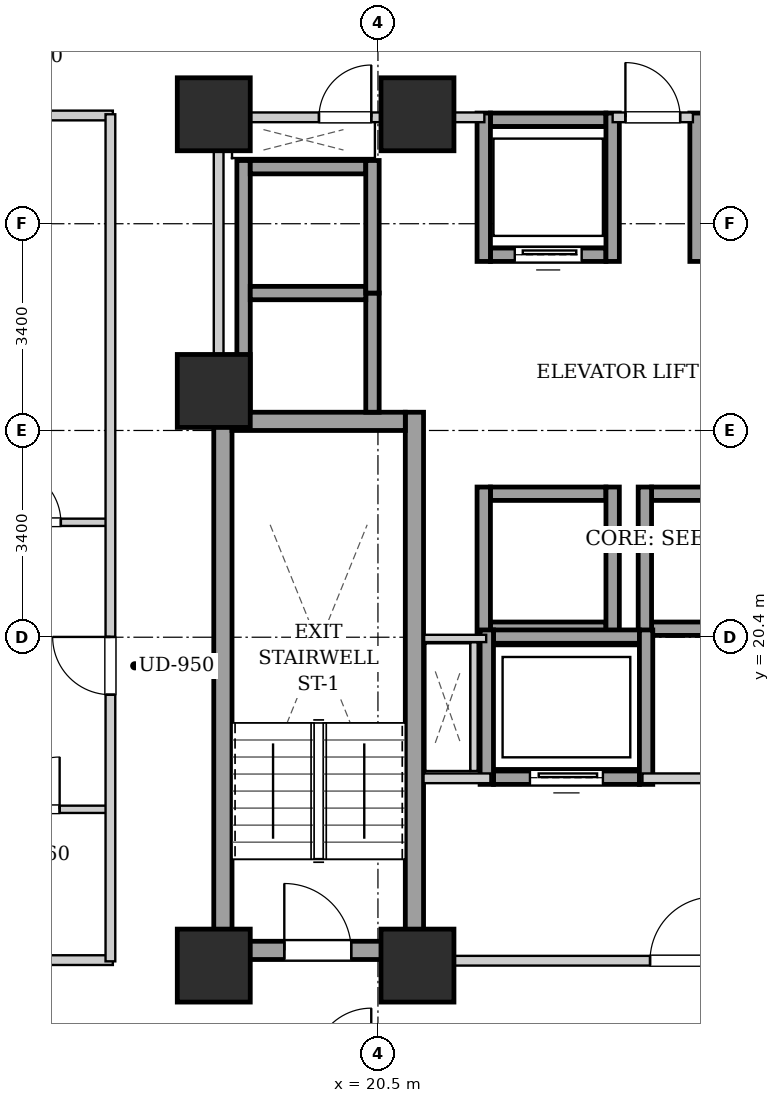
"""IFC4 building model, lengths in metres.
Left out: names, types, materials, properties, quantities, classifications, styles, units other than length and angle.
Written with IfcOpenShell. Run it as: python <this file> out.ifc"""

import sys

from ifc_helpers import new_model, si_unit, direction, frame, frame_2d, origin, origin_2d, place, context, subcontext, project, spatial, rectangle, extrude, element, fill, save


model = new_model("IFC4")
c1 = context("Model", 3, precision=1e-05, world=origin(), true_north=direction((0.0, 1.0)))
c2 = subcontext(c1, "Body", "Model", "MODEL_VIEW")
j1 = project(units=[si_unit("LENGTHUNIT", "METRE"), si_unit("PLANEANGLEUNIT", "RADIAN")], contexts=[c1])
p1 = place(None, origin())
s1 = spatial("IfcSite", under=j1, at=p1, CompositionType="ELEMENT")
p2 = place(p1, origin())
s2 = spatial("IfcBuilding", under=s1, at=p2, CompositionType="ELEMENT")
p3 = place(p2, frame((0.0, 0.0, 51.4)))
s3 = spatial("IfcBuildingStorey", under=s2, at=p3, CompositionType="ELEMENT", Elevation=51.4)
for number, where, z_axis, x_axis in (
    (1, (17.8, 15.0, 0.0), (0.0, 0.0, 1.0), (1.0, 0.0, 0.0)),
    (2, (21.15, 15.0, 0.0), (0.0, 0.0, 1.0), (1.0, 0.0, 0.0)),
    (3, (17.8, 29.0, 0.0), (0.0, 0.0, 1.0), (1.0, 0.0, 0.0)),
    (4, (21.15, 29.0, 0.0), (0.0, 0.0, 1.0), (1.0, 0.0, 0.0)),
    (5, (17.8, 24.45, 0.0), (0.0, 0.0, 1.0), (1.0, 0.0, 0.0)),
):
    element("IfcColumn", number, at=place(p3, frame(where, z_axis=z_axis, x_axis=x_axis)), inside=s3, PredefinedType="COLUMN", context=c2, shape_type="SweptSolid", body=[
        extrude(rectangle(XDim=1.2, YDim=1.2, at=origin_2d()), origin(), (0.0, 0.0, 1.0), 3.2),
    ])
for number, where, z_axis, x_axis in (
    (6, (17.95, 15.1, 0.0), (0.0, 0.0, 1.0), (0.0, 1.0, 0.0)),
    (7, (21.1, 15.1, 0.0), (0.0, 0.0, 1.0), (0.0, 1.0, 0.0)),
):
    element("IfcWall", number, at=place(p3, frame(where, z_axis=z_axis, x_axis=x_axis)), inside=s3, PredefinedType="SHEAR", context=c2, shape_type="SweptSolid", body=[
        extrude(rectangle(XDim=9.0, YDim=0.3, at=frame_2d((4.5, 0.0))), origin(), (0.0, 0.0, 1.0), 2.94),
    ])
p4 = place(p3, frame((18.1, 23.95, 0.0), z_axis=(0.0, 0.0, 1.0), x_axis=(1.0, 0.0, 0.0)))
e8 = element("IfcWall", 8, at=p4, inside=s3, PredefinedType="SHEAR", context=c2, shape_type="SweptSolid", body=[
    extrude(rectangle(XDim=2.85, YDim=0.3, at=frame_2d((1.425, 0.0))), origin(), (0.0, 0.0, 1.0), 2.94),
])
p5 = place(p3, frame((18.1, 15.25, 0.0), z_axis=(0.0, 0.0, 1.0), x_axis=(1.0, 0.0, 0.0)))
e9 = element("IfcWall", 9, at=p5, inside=s3, PredefinedType="SHEAR", context=c2, shape_type="SweptSolid", body=[
    extrude(rectangle(XDim=2.85, YDim=0.3, at=frame_2d((1.425, 0.0))), origin(), (0.0, 0.0, 1.0), 2.94),
])
p6 = place(p5, frame((0.86, 0.0, 0.0)))
e10 = element("IfcOpeningElement", 10, at=p6, cuts=e9, PredefinedType="OPENING", context=c2, shape_type="SweptSolid", body=[
    extrude(rectangle(XDim=1.1, YDim=2.05, at=frame_2d((0.55, 1.025))), frame((0.0, 0.16, 0.0), z_axis=(0.0, -1.0, 0.0), x_axis=(1.0, 0.0, 0.0)), (0.0, 0.0, 1.0), 0.32),
])
p7 = place(p3, frame((22.35, 26.69, 0.0), z_axis=(0.0, 0.0, 1.0), x_axis=(1.0, 0.0, 0.0)))
e11 = element("IfcWall", 11, at=p7, inside=s3, PredefinedType="SHEAR", context=c2, shape_type="SweptSolid", body=[
    extrude(rectangle(XDim=1.9, YDim=0.22, at=frame_2d((0.95, 0.0))), origin(), (0.0, 0.0, 1.0), 2.94),
])
p8 = place(p7, frame((0.4, 0.0, 0.0)))
e12 = element("IfcOpeningElement", 12, at=p8, cuts=e11, PredefinedType="OPENING", context=c2, shape_type="SweptSolid", body=[
    extrude(rectangle(XDim=1.1, YDim=2.15, at=frame_2d((0.55, 1.075))), frame((0.0, 0.12, 0.0), z_axis=(0.0, -1.0, 0.0), x_axis=(1.0, 0.0, 0.0)), (0.0, 0.0, 1.0), 0.24),
])
p9 = place(p3, frame((22.35, 28.91, 0.0), z_axis=(0.0, 0.0, 1.0), x_axis=(1.0, 0.0, 0.0)))
e13 = element("IfcWall", 13, at=p9, inside=s3, PredefinedType="SHEAR", context=c2, shape_type="SweptSolid", body=[
    extrude(rectangle(XDim=1.9, YDim=0.22, at=frame_2d((0.95, 0.0))), origin(), (0.0, 0.0, 1.0), 2.94),
])
for number, where, z_axis, x_axis in (
    (14, (22.24, 26.58, 0.0), (0.0, 0.0, 1.0), (0.0, 1.0, 0.0)),
    (15, (24.36, 26.58, 0.0), (0.0, 0.0, 1.0), (0.0, 1.0, 0.0)),
    (16, (25.74, 26.58, 0.0), (0.0, 0.0, 1.0), (0.0, 1.0, 0.0)),
):
    element("IfcWall", number, at=place(p3, frame(where, z_axis=z_axis, x_axis=x_axis)), inside=s3, PredefinedType="SHEAR", context=c2, shape_type="SweptSolid", body=[
        extrude(rectangle(XDim=2.44, YDim=0.22, at=frame_2d((1.22, 0.0))), origin(), (0.0, 0.0, 1.0), 2.94),
    ])
for number, where, z_axis, x_axis in (
    (17, (22.35, 20.54, 0.0), (0.0, 0.0, 1.0), (1.0, 0.0, 0.0)),
    (18, (22.35, 22.76, 0.0), (0.0, 0.0, 1.0), (1.0, 0.0, 0.0)),
):
    element("IfcWall", number, at=place(p3, frame(where, z_axis=z_axis, x_axis=x_axis)), inside=s3, PredefinedType="SHEAR", context=c2, shape_type="SweptSolid", body=[
        extrude(rectangle(XDim=1.9, YDim=0.22, at=frame_2d((0.95, 0.0))), origin(), (0.0, 0.0, 1.0), 2.94),
    ])
for number, where, z_axis, x_axis in (
    (19, (22.24, 20.43, 0.0), (0.0, 0.0, 1.0), (0.0, 1.0, 0.0)),
    (20, (24.36, 20.43, 0.0), (0.0, 0.0, 1.0), (0.0, 1.0, 0.0)),
):
    element("IfcWall", number, at=place(p3, frame(where, z_axis=z_axis, x_axis=x_axis)), inside=s3, PredefinedType="SHEAR", context=c2, shape_type="SweptSolid", body=[
        extrude(rectangle(XDim=2.44, YDim=0.22, at=frame_2d((1.22, 0.0))), origin(), (0.0, 0.0, 1.0), 2.94),
    ])
for number, where, z_axis, x_axis in (
    (21, (25.0, 20.54, 0.0), (0.0, 0.0, 1.0), (1.0, 0.0, 0.0)),
    (22, (25.0, 22.76, 0.0), (0.0, 0.0, 1.0), (1.0, 0.0, 0.0)),
):
    element("IfcWall", number, at=place(p3, frame(where, z_axis=z_axis, x_axis=x_axis)), inside=s3, PredefinedType="SHEAR", context=c2, shape_type="SweptSolid", body=[
        extrude(rectangle(XDim=1.9, YDim=0.22, at=frame_2d((0.95, 0.0))), origin(), (0.0, 0.0, 1.0), 2.94),
    ])
p10 = place(p3, frame((24.89, 20.43, 0.0), z_axis=(0.0, 0.0, 1.0), x_axis=(0.0, 1.0, 0.0)))
e23 = element("IfcWall", 23, at=p10, inside=s3, PredefinedType="SHEAR", context=c2, shape_type="SweptSolid", body=[
    extrude(rectangle(XDim=2.44, YDim=0.22, at=frame_2d((1.22, 0.0))), origin(), (0.0, 0.0, 1.0), 2.94),
])
p11 = place(p3, frame((18.29, 24.1, 0.0), z_axis=(0.0, 0.0, 1.0), x_axis=(0.0, 1.0, 0.0)))
e24 = element("IfcWall", 24, at=p11, inside=s3, PredefinedType="SHEAR", context=c2, shape_type="SweptSolid", body=[
    extrude(rectangle(XDim=4.14, YDim=0.22, at=frame_2d((2.07, 0.0))), origin(), (0.0, 0.0, 1.0), 2.94),
])
p12 = place(p3, frame((20.41, 24.1, 0.0), z_axis=(0.0, 0.0, 1.0), x_axis=(0.0, 1.0, 0.0)))
e25 = element("IfcWall", 25, at=p12, inside=s3, PredefinedType="SHEAR", context=c2, shape_type="SweptSolid", body=[
    extrude(rectangle(XDim=1.96, YDim=0.22, at=frame_2d((0.98, 0.0))), origin(), (0.0, 0.0, 1.0), 2.94),
])
for number, where, z_axis, x_axis in (
    (26, (18.4, 26.06, 0.0), (0.0, 0.0, 1.0), (1.0, 0.0, 0.0)),
    (27, (18.4, 28.13, 0.0), (0.0, 0.0, 1.0), (1.0, 0.0, 0.0)),
):
    element("IfcWall", number, at=place(p3, frame(where, z_axis=z_axis, x_axis=x_axis)), inside=s3, PredefinedType="SHEAR", context=c2, shape_type="SweptSolid", body=[
        extrude(rectangle(XDim=1.9, YDim=0.22, at=frame_2d((0.95, 0.0))), origin(), (0.0, 0.0, 1.0), 2.94),
    ])
p13 = place(p3, frame((20.41, 26.06, 0.0), z_axis=(0.0, 0.0, 1.0), x_axis=(0.0, 1.0, 0.0)))
e28 = element("IfcWall", 28, at=p13, inside=s3, PredefinedType="SHEAR", context=c2, shape_type="SweptSolid", body=[
    extrude(rectangle(XDim=2.18, YDim=0.22, at=frame_2d((1.09, 0.0))), origin(), (0.0, 0.0, 1.0), 2.94),
])
p14 = place(p3, frame((22.4, 18.09, 0.0), z_axis=(0.0, 0.0, 1.0), x_axis=(1.0, 0.0, 0.0)))
e29 = element("IfcWall", 29, at=p14, inside=s3, PredefinedType="SHEAR", context=c2, shape_type="SweptSolid", body=[
    extrude(rectangle(XDim=2.4, YDim=0.22, at=frame_2d((1.2, 0.0))), origin(), (0.0, 0.0, 1.0), 2.94),
])
p15 = place(p14, frame((0.6, 0.0, 0.0)))
e30 = element("IfcOpeningElement", 30, at=p15, cuts=e29, PredefinedType="OPENING", context=c2, shape_type="SweptSolid", body=[
    extrude(rectangle(XDim=1.2, YDim=2.15, at=frame_2d((0.6, 1.075))), frame((0.0, 0.12, 0.0), z_axis=(0.0, -1.0, 0.0), x_axis=(1.0, 0.0, 0.0)), (0.0, 0.0, 1.0), 0.24),
])
p16 = place(p3, frame((22.4, 20.41, 0.0), z_axis=(0.0, 0.0, 1.0), x_axis=(1.0, 0.0, 0.0)))
e31 = element("IfcWall", 31, at=p16, inside=s3, PredefinedType="SHEAR", context=c2, shape_type="SweptSolid", body=[
    extrude(rectangle(XDim=2.4, YDim=0.22, at=frame_2d((1.2, 0.0))), origin(), (0.0, 0.0, 1.0), 2.94),
])
for number, where, z_axis, x_axis in (
    (32, (22.29, 17.98, 0.0), (0.0, 0.0, 1.0), (0.0, 1.0, 0.0)),
    (33, (24.91, 17.98, 0.0), (0.0, 0.0, 1.0), (0.0, 1.0, 0.0)),
):
    element("IfcWall", number, at=place(p3, frame(where, z_axis=z_axis, x_axis=x_axis)), inside=s3, PredefinedType="SHEAR", context=c2, shape_type="SweptSolid", body=[
        extrude(rectangle(XDim=2.54, YDim=0.22, at=frame_2d((1.27, 0.0))), origin(), (0.0, 0.0, 1.0), 2.94),
    ])
p17 = place(p3, frame((21.25, 15.08, 0.0), z_axis=(0.0, 0.0, 1.0), x_axis=(1.0, 0.0, 0.0)))
e34 = element("IfcWall", 34, at=p17, inside=s3, PredefinedType="PARTITIONING", context=c2, shape_type="SweptSolid", body=[
    extrude(rectangle(XDim=8.5, YDim=0.16, at=frame_2d((4.25, 0.0))), origin(), (0.0, 0.0, 1.0), 2.232),
])
p18 = place(p17, frame((3.725, 0.0, 0.0)))
e35 = element("IfcOpeningElement", 35, at=p18, cuts=e34, PredefinedType="OPENING", context=c2, shape_type="SweptSolid", body=[
    extrude(rectangle(XDim=1.05, YDim=2.05, at=frame_2d((0.525, 1.025))), frame((0.0, 0.09, 0.0), z_axis=(0.0, -1.0, 0.0), x_axis=(1.0, 0.0, 0.0)), (0.0, 0.0, 1.0), 0.18),
])
p19 = place(p3, frame((21.25, 18.08, 0.0), z_axis=(0.0, 0.0, 1.0), x_axis=(1.0, 0.0, 0.0)))
e36 = element("IfcWall", 36, at=p19, inside=s3, PredefinedType="PARTITIONING", context=c2, shape_type="SweptSolid", body=[
    extrude(rectangle(XDim=1.1, YDim=0.16, at=frame_2d((0.55, 0.0))), origin(), (0.0, 0.0, 1.0), 2.94),
])
p20 = place(p3, frame((24.85, 18.08, 0.0), z_axis=(0.0, 0.0, 1.0), x_axis=(1.0, 0.0, 0.0)))
e37 = element("IfcWall", 37, at=p20, inside=s3, PredefinedType="PARTITIONING", context=c2, shape_type="SweptSolid", body=[
    extrude(rectangle(XDim=1.3, YDim=0.16, at=frame_2d((0.65, 0.0))), origin(), (0.0, 0.0, 1.0), 2.94),
])
p21 = place(p3, frame((17.88, 24.12, 0.0), z_axis=(0.0, 0.0, 1.0), x_axis=(0.0, 1.0, 0.0)))
e38 = element("IfcWall", 38, at=p21, inside=s3, PredefinedType="PARTITIONING", context=c2, shape_type="SweptSolid", body=[
    extrude(rectangle(XDim=4.76, YDim=0.16, at=frame_2d((2.38, 0.0))), origin(), (0.0, 0.0, 1.0), 2.94),
])
p22 = place(p3, frame((24.36, 28.95, 0.0), z_axis=(0.0, 0.0, 1.0), x_axis=(1.0, 0.0, 0.0)))
e39 = element("IfcWall", 39, at=p22, inside=s3, PredefinedType="PARTITIONING", context=c2, shape_type="SweptSolid", body=[
    extrude(rectangle(XDim=1.32, YDim=0.16, at=frame_2d((0.66, 0.0))), origin(), (0.0, 0.0, 1.0), 2.232),
])
p23 = place(p22, frame((0.21, 0.0, 0.0)))
e40 = element("IfcOpeningElement", 40, at=p23, cuts=e39, PredefinedType="OPENING", context=c2, shape_type="SweptSolid", body=[
    extrude(rectangle(XDim=0.9, YDim=2.05, at=frame_2d((0.45, 1.025))), frame((0.0, 0.09, 0.0), z_axis=(0.0, -1.0, 0.0), x_axis=(1.0, 0.0, 0.0)), (0.0, 0.0, 1.0), 0.18),
])
p24 = place(p3, frame((17.96, 28.95, 0.0), z_axis=(0.0, 0.0, 1.0), x_axis=(1.0, 0.0, 0.0)))
e41 = element("IfcWall", 41, at=p24, inside=s3, PredefinedType="PARTITIONING", context=c2, shape_type="SweptSolid", body=[
    extrude(rectangle(XDim=4.29, YDim=0.16, at=frame_2d((2.145, 0.0))), origin(), (0.0, 0.0, 1.0), 2.232),
])
p25 = place(p24, frame((1.57, 0.0, 0.0)))
e42 = element("IfcOpeningElement", 42, at=p25, cuts=e41, PredefinedType="OPENING", context=c2, shape_type="SweptSolid", body=[
    extrude(rectangle(XDim=0.86, YDim=2.05, at=frame_2d((0.43, 1.025))), frame((0.0, 0.09, 0.0), z_axis=(0.0, -1.0, 0.0), x_axis=(1.0, 0.0, 0.0)), (0.0, 0.0, 1.0), 0.18),
])
p26 = place(p3, frame((22.08, 18.2, 0.0), z_axis=(0.0, 0.0, 1.0), x_axis=(0.0, 1.0, 0.0)))
e43 = element("IfcWall", 43, at=p26, inside=s3, PredefinedType="PARTITIONING", context=c2, shape_type="SweptSolid", body=[
    extrude(rectangle(XDim=2.12, YDim=0.12, at=frame_2d((1.06, 0.0))), origin(), (0.0, 0.0, 1.0), 2.94),
])
p27 = place(p3, frame((22.28, 20.38, 0.0), z_axis=(0.0, 0.0, 1.0), x_axis=(-1.0, 0.0, 0.0)))
e44 = element("IfcWall", 44, at=p27, inside=s3, PredefinedType="PARTITIONING", context=c2, shape_type="SweptSolid", body=[
    extrude(rectangle(XDim=1.02, YDim=0.12, at=frame_2d((0.51, 0.0))), origin(), (0.0, 0.0, 1.0), 2.94),
])
for number, where, z_axis, x_axis in (
    (45, (7.78, 15.09, 0.0), (0.0, 0.0, 1.0), (1.0, 0.0, 0.0)),
    (46, (7.78, 28.98, 0.0), (0.0, 0.0, 1.0), (1.0, 0.0, 0.0)),
):
    element("IfcWall", number, at=place(p3, frame(where, z_axis=z_axis, x_axis=x_axis)), inside=s3, PredefinedType="PARTITIONING", context=c2, shape_type="SweptSolid", body=[
        extrude(rectangle(XDim=8.36, YDim=0.16, at=frame_2d((4.18, 0.0))), origin(), (0.0, 0.0, 1.0), 2.232),
    ])
p28 = place(p3, frame((13.61, 22.29, 0.0), z_axis=(0.0, 0.0, 1.0), x_axis=(1.0, 0.0, 0.0)))
e47 = element("IfcWall", 47, at=p28, inside=s3, PredefinedType="PARTITIONING", context=c2, shape_type="SweptSolid", body=[
    extrude(rectangle(XDim=2.45, YDim=0.12, at=frame_2d((1.225, 0.0))), origin(), (0.0, 0.0, 1.0), 2.94),
])
p29 = place(p28, frame((0.775, 0.0, 0.0)))
e48 = element("IfcOpeningElement", 48, at=p29, cuts=e47, PredefinedType="OPENING", context=c2, shape_type="SweptSolid", body=[
    extrude(rectangle(XDim=0.9, YDim=2.05, at=frame_2d((0.45, 1.025))), frame((0.0, 0.07, 0.0), z_axis=(0.0, -1.0, 0.0), x_axis=(1.0, 0.0, 0.0)), (0.0, 0.0, 1.0), 0.14),
])
p30 = place(p3, frame((13.61, 17.57, 0.0), z_axis=(0.0, 0.0, 1.0), x_axis=(1.0, 0.0, 0.0)))
e49 = element("IfcWall", 49, at=p30, inside=s3, PredefinedType="PARTITIONING", context=c2, shape_type="SweptSolid", body=[
    extrude(rectangle(XDim=2.45, YDim=0.12, at=frame_2d((1.225, 0.0))), origin(), (0.0, 0.0, 1.0), 2.94),
])
p31 = place(p30, frame((0.795, 0.0, 0.0)))
e50 = element("IfcOpeningElement", 50, at=p31, cuts=e49, PredefinedType="OPENING", context=c2, shape_type="SweptSolid", body=[
    extrude(rectangle(XDim=0.86, YDim=2.05, at=frame_2d((0.43, 1.025))), frame((0.0, 0.07, 0.0), z_axis=(0.0, -1.0, 0.0), x_axis=(1.0, 0.0, 0.0)), (0.0, 0.0, 1.0), 0.14),
])
p32 = place(p3, frame((16.1, 15.07, 0.0), z_axis=(0.0, 0.0, 1.0), x_axis=(0.0, 1.0, 0.0)))
e51 = element("IfcWall", 51, at=p32, inside=s3, PredefinedType="PARTITIONING", context=c2, shape_type="SweptSolid", body=[
    extrude(rectangle(XDim=13.93, YDim=0.16, at=frame_2d((6.965, 0.0))), origin(), (0.0, 0.0, 1.0), 2.94),
])
p33 = place(p32, frame((4.385, 0.0, 0.0)))
e52 = element("IfcOpeningElement", 52, at=p33, cuts=e51, PredefinedType="OPENING", context=c2, shape_type="SweptSolid", body=[
    extrude(rectangle(XDim=0.95, YDim=2.1, at=frame_2d((0.475, 1.05))), frame((0.0, 0.09, 0.0), z_axis=(0.0, -1.0, 0.0), x_axis=(1.0, 0.0, 0.0)), (0.0, 0.0, 1.0), 0.18),
])
p34 = place(p6, origin())
e53 = element("IfcDoor", 53, at=p34, inside=s3, OperationType="SINGLE_SWING_LEFT", PredefinedType="DOOR", context=c2, shape_type="SweptSolid", body=[
    extrude(rectangle(XDim=1.1, YDim=2.05, at=frame_2d((0.55, 1.025))), frame((0.0, 0.025, 0.0), z_axis=(0.0, -1.0, 0.0), x_axis=(1.0, 0.0, 0.0)), (0.0, 0.0, 1.0), 0.05),
])
fill(e10, e53)
p35 = place(p8, origin())
e54 = element("IfcDoor", 54, at=p35, inside=s3, OperationType="SLIDING_TO_LEFT", PredefinedType="DOOR", context=c2, shape_type="SweptSolid", body=[
    extrude(rectangle(XDim=1.1, YDim=2.15, at=frame_2d((0.55, 1.075))), frame((0.0, 0.025, 0.0), z_axis=(0.0, -1.0, 0.0), x_axis=(1.0, 0.0, 0.0)), (0.0, 0.0, 1.0), 0.05),
])
fill(e12, e54)
p36 = place(p15, origin())
e55 = element("IfcDoor", 55, at=p36, inside=s3, OperationType="SLIDING_TO_LEFT", PredefinedType="DOOR", context=c2, shape_type="SweptSolid", body=[
    extrude(rectangle(XDim=1.2, YDim=2.15, at=frame_2d((0.6, 1.075))), frame((0.0, 0.025, 0.0), z_axis=(0.0, -1.0, 0.0), x_axis=(1.0, 0.0, 0.0)), (0.0, 0.0, 1.0), 0.05),
])
fill(e30, e55)
p37 = place(p18, origin())
e56 = element("IfcDoor", 56, at=p37, inside=s3, OperationType="SINGLE_SWING_RIGHT", PredefinedType="DOOR", context=c2, shape_type="SweptSolid", body=[
    extrude(rectangle(XDim=1.05, YDim=2.05, at=frame_2d((0.525, 1.025))), frame((0.0, 0.025, 0.0), z_axis=(0.0, -1.0, 0.0), x_axis=(1.0, 0.0, 0.0)), (0.0, 0.0, 1.0), 0.05),
])
fill(e35, e56)
p38 = place(p23, origin())
e57 = element("IfcDoor", 57, at=p38, inside=s3, OperationType="SINGLE_SWING_LEFT", PredefinedType="DOOR", context=c2, shape_type="SweptSolid", body=[
    extrude(rectangle(XDim=0.9, YDim=2.05, at=frame_2d((0.45, 1.025))), frame((0.0, 0.025, 0.0), z_axis=(0.0, -1.0, 0.0), x_axis=(1.0, 0.0, 0.0)), (0.0, 0.0, 1.0), 0.05),
])
fill(e40, e57)
p39 = place(p25, origin())
e58 = element("IfcDoor", 58, at=p39, inside=s3, OperationType="SINGLE_SWING_RIGHT", PredefinedType="DOOR", context=c2, shape_type="SweptSolid", body=[
    extrude(rectangle(XDim=0.86, YDim=2.05, at=frame_2d((0.43, 1.025))), frame((0.0, 0.025, 0.0), z_axis=(0.0, -1.0, 0.0), x_axis=(1.0, 0.0, 0.0)), (0.0, 0.0, 1.0), 0.05),
])
fill(e42, e58)
p40 = place(p29, origin())
e59 = element("IfcDoor", 59, at=p40, inside=s3, OperationType="SINGLE_SWING_LEFT", PredefinedType="DOOR", context=c2, shape_type="SweptSolid", body=[
    extrude(rectangle(XDim=0.9, YDim=2.05, at=frame_2d((0.45, 1.025))), frame((0.0, 0.025, 0.0), z_axis=(0.0, -1.0, 0.0), x_axis=(1.0, 0.0, 0.0)), (0.0, 0.0, 1.0), 0.05),
])
fill(e48, e59)
p41 = place(p31, origin())
e60 = element("IfcDoor", 60, at=p41, inside=s3, OperationType="SINGLE_SWING_RIGHT", PredefinedType="DOOR", context=c2, shape_type="SweptSolid", body=[
    extrude(rectangle(XDim=0.86, YDim=2.05, at=frame_2d((0.43, 1.025))), frame((0.0, 0.025, 0.0), z_axis=(0.0, -1.0, 0.0), x_axis=(1.0, 0.0, 0.0)), (0.0, 0.0, 1.0), 0.05),
])
fill(e50, e60)
p42 = place(p33, origin())
e61 = element("IfcDoor", 61, at=p42, inside=s3, OperationType="SINGLE_SWING_RIGHT", PredefinedType="DOOR", context=c2, shape_type="SweptSolid", body=[
    extrude(rectangle(XDim=0.95, YDim=2.1, at=frame_2d((0.475, 1.05))), frame((0.0, 0.025, 0.0), z_axis=(0.0, -1.0, 0.0), x_axis=(1.0, 0.0, 0.0)), (0.0, 0.0, 1.0), 0.05),
])
fill(e52, e61)
save(model, sys.argv[1])
